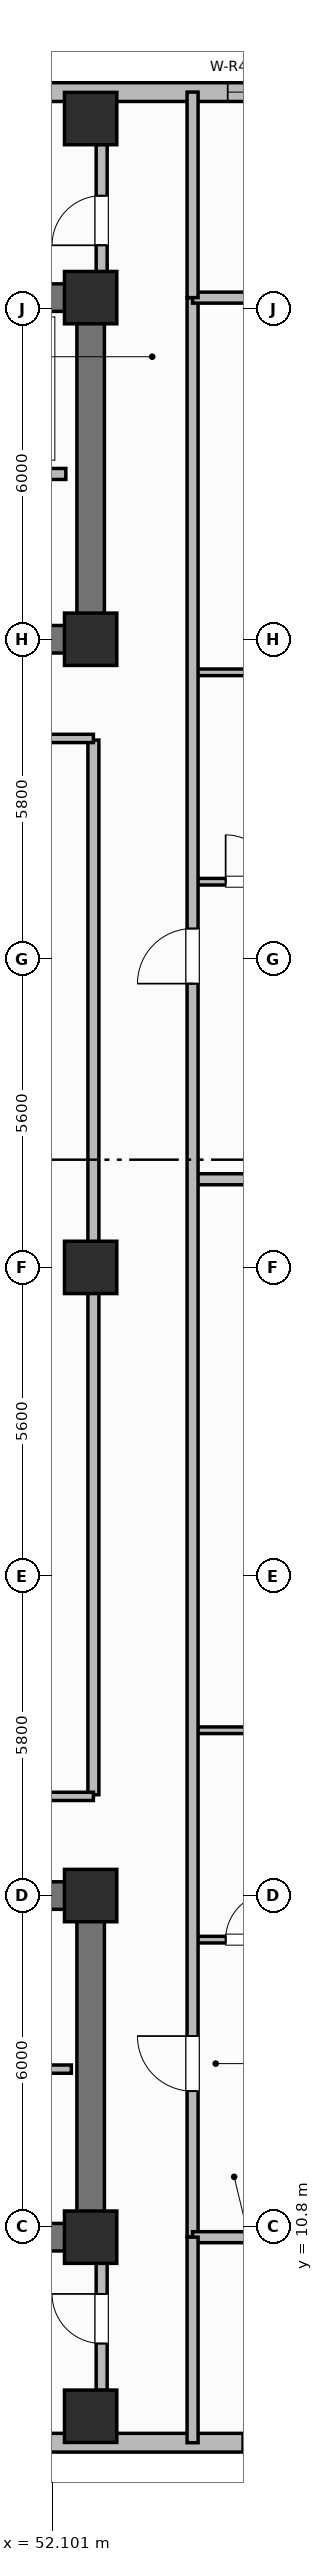
"""IFC4 building model, lengths in metres.
Left out: names, types, materials, properties, quantities, classifications, styles, units other than length and angle.
Written with IfcOpenShell. Run it as: python <this file> out.ifc"""

import sys

from ifc_helpers import new_model, si_unit, direction, frame, frame_2d, origin, origin_2d, place, context, subcontext, project, spatial, rectangle, extrude, element, fill, save


model = new_model("IFC4")
c1 = context("Model", 3, precision=1e-05, world=origin(), true_north=direction((0.0, 1.0)))
c2 = subcontext(c1, "Body", "Model", "MODEL_VIEW")
j1 = project(units=[si_unit("LENGTHUNIT", "METRE"), si_unit("PLANEANGLEUNIT", "RADIAN")], contexts=[c1])
p1 = place(None, origin())
s1 = spatial("IfcSite", under=j1, at=p1, CompositionType="ELEMENT")
p2 = place(p1, origin())
s2 = spatial("IfcBuilding", under=s1, at=p2, CompositionType="ELEMENT")
p3 = place(p2, frame((0.0, 0.0, 155.2)))
s3 = spatial("IfcBuildingStorey", under=s2, at=p3, CompositionType="ELEMENT", Elevation=155.2)
p4 = place(p3, frame((52.8, 10.6, 0.0), z_axis=(0.0, 0.0, 1.0), x_axis=(-1.0, 0.0, 0.0)))
e1 = element("IfcWall", 1, at=p4, inside=s3, PredefinedType="SHEAR", context=c2, shape_type="SweptSolid", body=[
    extrude(rectangle(XDim=27.2, YDim=0.5, at=frame_2d((13.6, 0.0))), origin(), (0.0, 0.0, 1.0), 3.7),
])
p5 = place(p3, frame((52.8, 10.85, 0.0), z_axis=(0.0, 0.0, 1.0), x_axis=(0.0, 1.0, 0.0)))
e2 = element("IfcWall", 2, at=p5, inside=s3, PredefinedType="SHEAR", context=c2, shape_type="SweptSolid", body=[
    extrude(rectangle(XDim=5.7, YDim=0.5, at=frame_2d((2.85, 0.0))), origin(), (0.0, 0.0, 1.0), 3.7),
])
p6 = place(p3, frame((25.6, 16.8, 0.0), z_axis=(0.0, 0.0, 1.0), x_axis=(1.0, 0.0, 0.0)))
e3 = element("IfcWall", 3, at=p6, inside=s3, PredefinedType="SHEAR", context=c2, shape_type="SweptSolid", body=[
    extrude(rectangle(XDim=27.2, YDim=0.5, at=frame_2d((13.6, 0.0))), origin(), (0.0, 0.0, 1.0), 3.7),
])
p7 = place(p6, frame((1.7, 0.0, 0.0)))
e4 = element("IfcOpeningElement", 4, at=p7, cuts=e3, PredefinedType="OPENING", context=c2, shape_type="SweptSolid", body=[
    extrude(rectangle(XDim=1.1, YDim=2.15, at=frame_2d((0.55, 1.075))), frame((0.0, 0.26, 0.0), z_axis=(0.0, -1.0, 0.0), x_axis=(1.0, 0.0, 0.0)), (0.0, 0.0, 1.0), 0.52),
])
p8 = place(p6, frame((4.45, 0.0, 0.0)))
e5 = element("IfcOpeningElement", 5, at=p8, cuts=e3, PredefinedType="OPENING", context=c2, shape_type="SweptSolid", body=[
    extrude(rectangle(XDim=0.85, YDim=2.1, at=frame_2d((0.425, 1.05))), frame((0.0, 0.26, 0.0), z_axis=(0.0, -1.0, 0.0), x_axis=(1.0, 0.0, 0.0)), (0.0, 0.0, 1.0), 0.52),
])
p9 = place(p6, frame((6.5, 0.0, 0.0)))
e6 = element("IfcOpeningElement", 6, at=p9, cuts=e3, PredefinedType="OPENING", context=c2, shape_type="SweptSolid", body=[
    extrude(rectangle(XDim=0.85, YDim=2.1, at=frame_2d((0.425, 1.05))), frame((0.0, 0.26, 0.0), z_axis=(0.0, -1.0, 0.0), x_axis=(1.0, 0.0, 0.0)), (0.0, 0.0, 1.0), 0.52),
])
p10 = place(p6, frame((13.0, 0.0, 0.0)))
e7 = element("IfcOpeningElement", 7, at=p10, cuts=e3, PredefinedType="OPENING", context=c2, shape_type="SweptSolid", body=[
    extrude(rectangle(XDim=1.2, YDim=2.15, at=frame_2d((0.6, 1.075))), frame((0.0, 0.26, 0.0), z_axis=(0.0, -1.0, 0.0), x_axis=(1.0, 0.0, 0.0)), (0.0, 0.0, 1.0), 0.52),
])
p11 = place(p6, frame((19.8, 0.0, 0.0)))
e8 = element("IfcOpeningElement", 8, at=p11, cuts=e3, PredefinedType="OPENING", context=c2, shape_type="SweptSolid", body=[
    extrude(rectangle(XDim=0.85, YDim=2.1, at=frame_2d((0.425, 1.05))), frame((0.0, 0.26, 0.0), z_axis=(0.0, -1.0, 0.0), x_axis=(1.0, 0.0, 0.0)), (0.0, 0.0, 1.0), 0.52),
])
p12 = place(p6, frame((24.2, 0.0, 0.0)))
e9 = element("IfcOpeningElement", 9, at=p12, cuts=e3, PredefinedType="OPENING", context=c2, shape_type="SweptSolid", body=[
    extrude(rectangle(XDim=0.85, YDim=2.1, at=frame_2d((0.425, 1.05))), frame((0.0, 0.26, 0.0), z_axis=(0.0, -1.0, 0.0), x_axis=(1.0, 0.0, 0.0)), (0.0, 0.0, 1.0), 0.52),
])
p13 = place(p3, frame((25.6, 45.8, 0.0), z_axis=(0.0, 0.0, 1.0), x_axis=(1.0, 0.0, 0.0)))
e10 = element("IfcWall", 10, at=p13, inside=s3, PredefinedType="SHEAR", context=c2, shape_type="SweptSolid", body=[
    extrude(rectangle(XDim=27.2, YDim=0.5, at=frame_2d((13.6, 0.0))), origin(), (0.0, 0.0, 1.0), 3.7),
])
p14 = place(p3, frame((52.8, 39.85, 0.0), z_axis=(0.0, 0.0, 1.0), x_axis=(0.0, 1.0, 0.0)))
e11 = element("IfcWall", 11, at=p14, inside=s3, PredefinedType="SHEAR", context=c2, shape_type="SweptSolid", body=[
    extrude(rectangle(XDim=5.7, YDim=0.5, at=frame_2d((2.85, 0.0))), origin(), (0.0, 0.0, 1.0), 3.7),
])
p15 = place(p3, frame((52.8, 39.6, 0.0), z_axis=(0.0, 0.0, 1.0), x_axis=(-1.0, 0.0, 0.0)))
e12 = element("IfcWall", 12, at=p15, inside=s3, PredefinedType="SHEAR", context=c2, shape_type="SweptSolid", body=[
    extrude(rectangle(XDim=27.2, YDim=0.5, at=frame_2d((13.6, 0.0))), origin(), (0.0, 0.0, 1.0), 3.7),
])
p16 = place(p15, frame((24.3, 0.0, 0.0)))
e13 = element("IfcOpeningElement", 13, at=p16, cuts=e12, PredefinedType="OPENING", context=c2, shape_type="SweptSolid", body=[
    extrude(rectangle(XDim=1.1, YDim=2.15, at=frame_2d((0.55, 1.075))), frame((0.0, 0.26, 0.0), z_axis=(0.0, -1.0, 0.0), x_axis=(1.0, 0.0, 0.0)), (0.0, 0.0, 1.0), 0.52),
])
p17 = place(p15, frame((21.85, 0.0, 0.0)))
e14 = element("IfcOpeningElement", 14, at=p17, cuts=e12, PredefinedType="OPENING", context=c2, shape_type="SweptSolid", body=[
    extrude(rectangle(XDim=0.85, YDim=2.1, at=frame_2d((0.425, 1.05))), frame((0.0, 0.26, 0.0), z_axis=(0.0, -1.0, 0.0), x_axis=(1.0, 0.0, 0.0)), (0.0, 0.0, 1.0), 0.52),
])
p18 = place(p15, frame((19.85, 0.0, 0.0)))
e15 = element("IfcOpeningElement", 15, at=p18, cuts=e12, PredefinedType="OPENING", context=c2, shape_type="SweptSolid", body=[
    extrude(rectangle(XDim=0.85, YDim=2.1, at=frame_2d((0.425, 1.05))), frame((0.0, 0.26, 0.0), z_axis=(0.0, -1.0, 0.0), x_axis=(1.0, 0.0, 0.0)), (0.0, 0.0, 1.0), 0.52),
])
p19 = place(p15, frame((15.1, 0.0, 0.0)))
e16 = element("IfcOpeningElement", 16, at=p19, cuts=e12, PredefinedType="OPENING", context=c2, shape_type="SweptSolid", body=[
    extrude(rectangle(XDim=1.2, YDim=2.15, at=frame_2d((0.6, 1.075))), frame((0.0, 0.26, 0.0), z_axis=(0.0, -1.0, 0.0), x_axis=(1.0, 0.0, 0.0)), (0.0, 0.0, 1.0), 0.52),
])
p20 = place(p15, frame((12.6, 0.0, 0.0)))
e17 = element("IfcOpeningElement", 17, at=p20, cuts=e12, PredefinedType="OPENING", context=c2, shape_type="SweptSolid", body=[
    extrude(rectangle(XDim=0.85, YDim=2.1, at=frame_2d((0.425, 1.05))), frame((0.0, 0.26, 0.0), z_axis=(0.0, -1.0, 0.0), x_axis=(1.0, 0.0, 0.0)), (0.0, 0.0, 1.0), 0.52),
])
p21 = place(p15, frame((10.85, 0.0, 0.0)))
e18 = element("IfcOpeningElement", 18, at=p21, cuts=e12, PredefinedType="OPENING", context=c2, shape_type="SweptSolid", body=[
    extrude(rectangle(XDim=0.85, YDim=2.1, at=frame_2d((0.425, 1.05))), frame((0.0, 0.26, 0.0), z_axis=(0.0, -1.0, 0.0), x_axis=(1.0, 0.0, 0.0)), (0.0, 0.0, 1.0), 0.52),
])
p22 = place(p15, frame((7.35, 0.0, 0.0)))
e19 = element("IfcOpeningElement", 19, at=p22, cuts=e12, PredefinedType="OPENING", context=c2, shape_type="SweptSolid", body=[
    extrude(rectangle(XDim=0.85, YDim=2.1, at=frame_2d((0.425, 1.05))), frame((0.0, 0.26, 0.0), z_axis=(0.0, -1.0, 0.0), x_axis=(1.0, 0.0, 0.0)), (0.0, 0.0, 1.0), 0.52),
])
p23 = place(p15, frame((5.35, 0.0, 0.0)))
e20 = element("IfcOpeningElement", 20, at=p23, cuts=e12, PredefinedType="OPENING", context=c2, shape_type="SweptSolid", body=[
    extrude(rectangle(XDim=0.85, YDim=2.1, at=frame_2d((0.425, 1.05))), frame((0.0, 0.26, 0.0), z_axis=(0.0, -1.0, 0.0), x_axis=(1.0, 0.0, 0.0)), (0.0, 0.0, 1.0), 0.52),
])
p24 = place(p15, frame((2.0, 0.0, 0.0)))
e21 = element("IfcOpeningElement", 21, at=p24, cuts=e12, PredefinedType="OPENING", context=c2, shape_type="SweptSolid", body=[
    extrude(rectangle(XDim=0.85, YDim=2.1, at=frame_2d((0.425, 1.05))), frame((0.0, 0.26, 0.0), z_axis=(0.0, -1.0, 0.0), x_axis=(1.0, 0.0, 0.0)), (0.0, 0.0, 1.0), 0.52),
])
for number, where, z_axis, x_axis in (
    (22, (52.8, 10.6, 0.0), (0.0, 0.0, 1.0), (1.0, 0.0, 0.0)),
    (23, (52.8, 16.8, 0.0), (0.0, 0.0, 1.0), (1.0, 0.0, 0.0)),
    (24, (52.8, 39.6, 0.0), (0.0, 0.0, 1.0), (1.0, 0.0, 0.0)),
    (25, (52.8, 45.8, 0.0), (0.0, 0.0, 1.0), (1.0, 0.0, 0.0)),
    (26, (52.8, 28.2, 0.0), (0.0, 0.0, 1.0), (1.0, 0.0, 0.0)),
    (27, (52.8, 7.35, 0.0), (0.0, 0.0, 1.0), (1.0, 0.0, 0.0)),
    (28, (52.8, 49.05, 0.0), (0.0, 0.0, 1.0), (1.0, 0.0, 0.0)),
):
    element("IfcColumn", number, at=place(p3, frame(where, z_axis=z_axis, x_axis=x_axis)), inside=s3, PredefinedType="COLUMN", context=c2, shape_type="SweptSolid", body=[
        extrude(rectangle(XDim=0.95, YDim=0.95, at=origin_2d()), origin(), (0.0, 0.0, 1.0), 3.7),
    ])
p25 = place(p3, frame((42.4, 6.87, 0.0), z_axis=(0.0, 0.0, 1.0), x_axis=(1.0, 0.0, 0.0)))
e29 = element("IfcWall", 29, at=p25, inside=s3, PredefinedType="SOLIDWALL", context=c2, shape_type="SweptSolid", body=[
    extrude(rectangle(XDim=15.8, YDim=0.34, at=frame_2d((7.9, 0.0))), origin(), (0.0, 0.0, 1.0), 2.72),
])
p26 = place(p25, frame((2.25, 0.0, 0.95)))
e30 = element("IfcOpeningElement", 30, at=p26, cuts=e29, PredefinedType="OPENING", context=c2, shape_type="SweptSolid", body=[
    extrude(rectangle(XDim=1.1, YDim=1.65, at=frame_2d((0.55, 0.825))), frame((0.0, 0.18, 0.0), z_axis=(0.0, -1.0, 0.0), x_axis=(1.0, 0.0, 0.0)), (0.0, 0.0, 1.0), 0.36),
])
p27 = place(p25, frame((5.15, 0.0, 0.95)))
e31 = element("IfcOpeningElement", 31, at=p27, cuts=e29, PredefinedType="OPENING", context=c2, shape_type="SweptSolid", body=[
    extrude(rectangle(XDim=1.1, YDim=1.65, at=frame_2d((0.55, 0.825))), frame((0.0, 0.18, 0.0), z_axis=(0.0, -1.0, 0.0), x_axis=(1.0, 0.0, 0.0)), (0.0, 0.0, 1.0), 0.36),
])
p28 = place(p25, frame((7.35, 0.0, 0.95)))
e32 = element("IfcOpeningElement", 32, at=p28, cuts=e29, PredefinedType="OPENING", context=c2, shape_type="SweptSolid", body=[
    extrude(rectangle(XDim=1.1, YDim=1.65, at=frame_2d((0.55, 0.825))), frame((0.0, 0.18, 0.0), z_axis=(0.0, -1.0, 0.0), x_axis=(1.0, 0.0, 0.0)), (0.0, 0.0, 1.0), 0.36),
])
p29 = place(p25, frame((13.15, 0.0, 0.95)))
e33 = element("IfcOpeningElement", 33, at=p29, cuts=e29, PredefinedType="OPENING", context=c2, shape_type="SweptSolid", body=[
    extrude(rectangle(XDim=1.1, YDim=1.65, at=frame_2d((0.55, 0.825))), frame((0.0, 0.18, 0.0), z_axis=(0.0, -1.0, 0.0), x_axis=(1.0, 0.0, 0.0)), (0.0, 0.0, 1.0), 0.36),
])
p30 = place(p3, frame((58.2, 49.53, 0.0), z_axis=(0.0, 0.0, 1.0), x_axis=(-1.0, 0.0, 0.0)))
e34 = element("IfcWall", 34, at=p30, inside=s3, PredefinedType="SOLIDWALL", context=c2, shape_type="SweptSolid", body=[
    extrude(rectangle(XDim=15.8, YDim=0.34, at=frame_2d((7.9, 0.0))), origin(), (0.0, 0.0, 1.0), 2.72),
])
p31 = place(p30, frame((1.312, 0.0, 0.7)))
e35 = element("IfcOpeningElement", 35, at=p31, cuts=e34, PredefinedType="OPENING", context=c2, shape_type="SweptSolid", body=[
    extrude(rectangle(XDim=1.6, YDim=1.9, at=frame_2d((0.8, 0.95))), frame((0.0, 0.18, 0.0), z_axis=(0.0, -1.0, 0.0), x_axis=(1.0, 0.0, 0.0)), (0.0, 0.0, 1.0), 0.36),
])
p32 = place(p30, frame((8.562, 0.0, 0.7)))
e36 = element("IfcOpeningElement", 36, at=p32, cuts=e34, PredefinedType="OPENING", context=c2, shape_type="SweptSolid", body=[
    extrude(rectangle(XDim=1.6, YDim=1.9, at=frame_2d((0.8, 0.95))), frame((0.0, 0.18, 0.0), z_axis=(0.0, -1.0, 0.0), x_axis=(1.0, 0.0, 0.0)), (0.0, 0.0, 1.0), 0.36),
])
p33 = place(p30, frame((11.837, 0.0, 0.7)))
e37 = element("IfcOpeningElement", 37, at=p33, cuts=e34, PredefinedType="OPENING", context=c2, shape_type="SweptSolid", body=[
    extrude(rectangle(XDim=1.6, YDim=1.9, at=frame_2d((0.8, 0.95))), frame((0.0, 0.18, 0.0), z_axis=(0.0, -1.0, 0.0), x_axis=(1.0, 0.0, 0.0)), (0.0, 0.0, 1.0), 0.36),
])
p34 = place(p3, frame((48.05, 13.65, 0.0), z_axis=(0.0, 0.0, 1.0), x_axis=(1.0, 0.0, 0.0)))
e38 = element("IfcWall", 38, at=p34, inside=s3, PredefinedType="PARTITIONING", context=c2, shape_type="SweptSolid", body=[
    extrude(rectangle(XDim=4.4, YDim=0.15, at=frame_2d((2.2, 0.0))), origin(), (0.0, 0.0, 1.0), 2.55),
])
p35 = place(p34, frame((1.6, 0.0, 0.0)))
e39 = element("IfcOpeningElement", 39, at=p35, cuts=e38, PredefinedType="OPENING", context=c2, shape_type="SweptSolid", body=[
    extrude(rectangle(XDim=0.85, YDim=2.1, at=frame_2d((0.425, 1.05))), frame((0.0, 0.085, 0.0), z_axis=(0.0, -1.0, 0.0), x_axis=(1.0, 0.0, 0.0)), (0.0, 0.0, 1.0), 0.17),
])
p36 = place(p3, frame((52.35, 42.6, 0.0), z_axis=(0.0, 0.0, 1.0), x_axis=(-1.0, 0.0, 0.0)))
e40 = element("IfcWall", 40, at=p36, inside=s3, PredefinedType="PARTITIONING", context=c2, shape_type="SweptSolid", body=[
    extrude(rectangle(XDim=6.5, YDim=0.2, at=frame_2d((3.25, 0.0))), origin(), (0.0, 0.0, 1.0), 2.55),
])
p37 = place(p3, frame((52.85, 18.63, 0.0), z_axis=(0.0, 0.0, 1.0), x_axis=(0.0, 1.0, 0.0)))
e41 = element("IfcWall", 41, at=p37, inside=s3, PredefinedType="PARTITIONING", context=c2, shape_type="SweptSolid", body=[
    extrude(rectangle(XDim=19.14, YDim=0.2, at=frame_2d((9.57, 0.0))), origin(), (0.0, 0.0, 1.0), 2.55),
])
for number, where, z_axis, x_axis in (
    (42, (31.35, 18.6, 0.0), (0.0, 0.0, 1.0), (1.0, 0.0, 0.0)),
    (43, (31.35, 37.8, 0.0), (0.0, 0.0, 1.0), (1.0, 0.0, 0.0)),
):
    element("IfcWall", number, at=place(p3, frame(where, z_axis=z_axis, x_axis=x_axis)), inside=s3, PredefinedType="PARTITIONING", context=c2, shape_type="SweptSolid", body=[
        extrude(rectangle(XDim=21.5, YDim=0.15, at=frame_2d((10.75, 0.0))), origin(), (0.0, 0.0, 1.0), 2.55),
    ])
p38 = place(p3, frame((54.65, 16.0, 0.0), z_axis=(0.0, 0.0, 1.0), x_axis=(1.0, 0.0, 0.0)))
e44 = element("IfcWall", 44, at=p38, inside=s3, PredefinedType="PARTITIONING", context=c2, shape_type="SweptSolid", body=[
    extrude(rectangle(XDim=2.25, YDim=0.12, at=frame_2d((1.125, 0.0))), origin(), (0.0, 0.0, 1.0), 2.55),
])
p39 = place(p38, frame((0.6, 0.0, 0.0)))
e45 = element("IfcOpeningElement", 45, at=p39, cuts=e44, PredefinedType="OPENING", context=c2, shape_type="SweptSolid", body=[
    extrude(rectangle(XDim=0.85, YDim=2.1, at=frame_2d((0.425, 1.05))), frame((0.0, 0.07, 0.0), z_axis=(0.0, -1.0, 0.0), x_axis=(1.0, 0.0, 0.0)), (0.0, 0.0, 1.0), 0.14),
])
p40 = place(p3, frame((54.65, 19.8, 0.0), z_axis=(0.0, 0.0, 1.0), x_axis=(1.0, 0.0, 0.0)))
e46 = element("IfcWall", 46, at=p40, inside=s3, PredefinedType="PARTITIONING", context=c2, shape_type="SweptSolid", body=[
    extrude(rectangle(XDim=2.25, YDim=0.12, at=frame_2d((1.125, 0.0))), origin(), (0.0, 0.0, 1.0), 2.55),
])
p41 = place(p3, frame((54.65, 29.8, 0.0), z_axis=(0.0, 0.0, 1.0), x_axis=(1.0, 0.0, 0.0)))
e47 = element("IfcWall", 47, at=p41, inside=s3, PredefinedType="PARTITIONING", context=c2, shape_type="SweptSolid", body=[
    extrude(rectangle(XDim=6.666, YDim=0.2, at=frame_2d((3.333, 0.0))), origin(), (0.0, 0.0, 1.0), 2.55),
])
p42 = place(p3, frame((54.65, 35.2, 0.0), z_axis=(0.0, 0.0, 1.0), x_axis=(1.0, 0.0, 0.0)))
e48 = element("IfcWall", 48, at=p42, inside=s3, PredefinedType="PARTITIONING", context=c2, shape_type="SweptSolid", body=[
    extrude(rectangle(XDim=2.25, YDim=0.12, at=frame_2d((1.125, 0.0))), origin(), (0.0, 0.0, 1.0), 2.55),
])
p43 = place(p42, frame((0.6, 0.0, 0.0)))
e49 = element("IfcOpeningElement", 49, at=p43, cuts=e48, PredefinedType="OPENING", context=c2, shape_type="SweptSolid", body=[
    extrude(rectangle(XDim=0.85, YDim=2.1, at=frame_2d((0.425, 1.05))), frame((0.0, 0.07, 0.0), z_axis=(0.0, -1.0, 0.0), x_axis=(1.0, 0.0, 0.0)), (0.0, 0.0, 1.0), 0.14),
])
p44 = place(p3, frame((54.65, 39.0, 0.0), z_axis=(0.0, 0.0, 1.0), x_axis=(1.0, 0.0, 0.0)))
e50 = element("IfcWall", 50, at=p44, inside=s3, PredefinedType="PARTITIONING", context=c2, shape_type="SweptSolid", body=[
    extrude(rectangle(XDim=2.25, YDim=0.12, at=frame_2d((1.125, 0.0))), origin(), (0.0, 0.0, 1.0), 2.55),
])
p45 = place(p3, frame((54.65, 10.6, 0.0), z_axis=(0.0, 0.0, 1.0), x_axis=(0.0, 1.0, 0.0)))
e51 = element("IfcWall", 51, at=p45, inside=s3, PredefinedType="PARTITIONING", context=c2, shape_type="SweptSolid", body=[
    extrude(rectangle(XDim=35.2, YDim=0.2, at=frame_2d((17.6, 0.0))), origin(), (0.0, 0.0, 1.0), 2.55),
])
p46 = place(p45, frame((2.65, 0.0, 0.0)))
e52 = element("IfcOpeningElement", 52, at=p46, cuts=e51, PredefinedType="OPENING", context=c2, shape_type="SweptSolid", body=[
    extrude(rectangle(XDim=1.0, YDim=2.15, at=frame_2d((0.5, 1.075))), frame((0.0, 0.11, 0.0), z_axis=(0.0, -1.0, 0.0), x_axis=(1.0, 0.0, 0.0)), (0.0, 0.0, 1.0), 0.22),
])
p47 = place(p45, frame((22.75, 0.0, 0.0)))
e53 = element("IfcOpeningElement", 53, at=p47, cuts=e51, PredefinedType="OPENING", context=c2, shape_type="SweptSolid", body=[
    extrude(rectangle(XDim=1.0, YDim=2.15, at=frame_2d((0.5, 1.075))), frame((0.0, 0.11, 0.0), z_axis=(0.0, -1.0, 0.0), x_axis=(1.0, 0.0, 0.0)), (0.0, 0.0, 1.0), 0.22),
])
for number, where, z_axis, x_axis in (
    (54, (54.65, 10.6, 0.0), (0.0, 0.0, 1.0), (1.0, 0.0, 0.0)),
    (55, (54.65, 45.8, 0.0), (0.0, 0.0, 1.0), (1.0, 0.0, 0.0)),
):
    element("IfcWall", number, at=place(p3, frame(where, z_axis=z_axis, x_axis=x_axis)), inside=s3, PredefinedType="PARTITIONING", context=c2, shape_type="SweptSolid", body=[
        extrude(rectangle(XDim=6.76, YDim=0.2, at=frame_2d((3.38, 0.0))), origin(), (0.0, 0.0, 1.0), 2.55),
    ])
for number, where, z_axis, x_axis in (
    (56, (54.65, 6.87, 0.0), (0.0, 0.0, 1.0), (0.0, 1.0, 0.0)),
    (57, (54.65, 45.8, 0.0), (0.0, 0.0, 1.0), (0.0, 1.0, 0.0)),
):
    element("IfcWall", number, at=place(p3, frame(where, z_axis=z_axis, x_axis=x_axis)), inside=s3, PredefinedType="PARTITIONING", context=c2, shape_type="SweptSolid", body=[
        extrude(rectangle(XDim=3.73, YDim=0.2, at=frame_2d((1.865, 0.0))), origin(), (0.0, 0.0, 1.0), 2.55),
    ])
p48 = place(p3, frame((53.0, 7.82, 0.0), z_axis=(0.0, 0.0, 1.0), x_axis=(0.0, 1.0, 0.0)))
e58 = element("IfcWall", 58, at=p48, inside=s3, PredefinedType="PARTITIONING", context=c2, shape_type="SweptSolid", body=[
    extrude(rectangle(XDim=2.48, YDim=0.2, at=frame_2d((1.24, 0.0))), origin(), (0.0, 0.0, 1.0), 2.55),
])
p49 = place(p48, frame((0.85, 0.0, 0.0)))
e59 = element("IfcOpeningElement", 59, at=p49, cuts=e58, PredefinedType="OPENING", context=c2, shape_type="SweptSolid", body=[
    extrude(rectangle(XDim=0.9, YDim=2.1, at=frame_2d((0.45, 1.05))), frame((0.0, 0.11, 0.0), z_axis=(0.0, -1.0, 0.0), x_axis=(1.0, 0.0, 0.0)), (0.0, 0.0, 1.0), 0.22),
])
p50 = place(p3, frame((53.0, 46.1, 0.0), z_axis=(0.0, 0.0, 1.0), x_axis=(0.0, 1.0, 0.0)))
e60 = element("IfcWall", 60, at=p50, inside=s3, PredefinedType="PARTITIONING", context=c2, shape_type="SweptSolid", body=[
    extrude(rectangle(XDim=2.48, YDim=0.2, at=frame_2d((1.24, 0.0))), origin(), (0.0, 0.0, 1.0), 2.55),
])
p51 = place(p50, frame((0.65, 0.0, 0.0)))
e61 = element("IfcOpeningElement", 61, at=p51, cuts=e60, PredefinedType="OPENING", context=c2, shape_type="SweptSolid", body=[
    extrude(rectangle(XDim=0.9, YDim=2.1, at=frame_2d((0.45, 1.05))), frame((0.0, 0.11, 0.0), z_axis=(0.0, -1.0, 0.0), x_axis=(1.0, 0.0, 0.0)), (0.0, 0.0, 1.0), 0.22),
])
p52 = place(p29, origin())
e62 = element("IfcWindow", 62, at=p52, inside=s3, PartitioningType="SINGLE_PANEL", PredefinedType="WINDOW", context=c2, shape_type="SweptSolid", body=[
    extrude(rectangle(XDim=1.1, YDim=1.65, at=frame_2d((0.55, 0.825))), frame((0.0, 0.03, 0.0), z_axis=(0.0, -1.0, 0.0), x_axis=(1.0, 0.0, 0.0)), (0.0, 0.0, 1.0), 0.06),
])
fill(e33, e62)
p53 = place(p31, origin())
e63 = element("IfcWindow", 63, at=p53, inside=s3, PartitioningType="SINGLE_PANEL", PredefinedType="WINDOW", context=c2, shape_type="SweptSolid", body=[
    extrude(rectangle(XDim=1.6, YDim=1.9, at=frame_2d((0.8, 0.95))), frame((0.0, 0.03, 0.0), z_axis=(0.0, -1.0, 0.0), x_axis=(1.0, 0.0, 0.0)), (0.0, 0.0, 1.0), 0.06),
])
fill(e35, e63)
p54 = place(p39, origin())
e64 = element("IfcDoor", 64, at=p54, inside=s3, OperationType="SINGLE_SWING_RIGHT", PredefinedType="DOOR", context=c2, shape_type="SweptSolid", body=[
    extrude(rectangle(XDim=0.85, YDim=2.1, at=frame_2d((0.425, 1.05))), frame((0.0, 0.025, 0.0), z_axis=(0.0, -1.0, 0.0), x_axis=(1.0, 0.0, 0.0)), (0.0, 0.0, 1.0), 0.05),
])
fill(e45, e64)
p55 = place(p43, origin())
e65 = element("IfcDoor", 65, at=p55, inside=s3, OperationType="SINGLE_SWING_LEFT", PredefinedType="DOOR", context=c2, shape_type="SweptSolid", body=[
    extrude(rectangle(XDim=0.85, YDim=2.1, at=frame_2d((0.425, 1.05))), frame((0.0, 0.025, 0.0), z_axis=(0.0, -1.0, 0.0), x_axis=(1.0, 0.0, 0.0)), (0.0, 0.0, 1.0), 0.05),
])
fill(e49, e65)
p56 = place(p46, origin())
e66 = element("IfcDoor", 66, at=p56, inside=s3, OperationType="SINGLE_SWING_RIGHT", PredefinedType="DOOR", context=c2, shape_type="SweptSolid", body=[
    extrude(rectangle(XDim=1.0, YDim=2.15, at=frame_2d((0.5, 1.075))), frame((0.0, 0.025, 0.0), z_axis=(0.0, -1.0, 0.0), x_axis=(1.0, 0.0, 0.0)), (0.0, 0.0, 1.0), 0.05),
])
fill(e52, e66)
p57 = place(p47, origin())
e67 = element("IfcDoor", 67, at=p57, inside=s3, OperationType="SINGLE_SWING_LEFT", PredefinedType="DOOR", context=c2, shape_type="SweptSolid", body=[
    extrude(rectangle(XDim=1.0, YDim=2.15, at=frame_2d((0.5, 1.075))), frame((0.0, 0.025, 0.0), z_axis=(0.0, -1.0, 0.0), x_axis=(1.0, 0.0, 0.0)), (0.0, 0.0, 1.0), 0.05),
])
fill(e53, e67)
p58 = place(p49, origin())
e68 = element("IfcDoor", 68, at=p58, inside=s3, OperationType="SINGLE_SWING_RIGHT", PredefinedType="DOOR", context=c2, shape_type="SweptSolid", body=[
    extrude(rectangle(XDim=0.9, YDim=2.1, at=frame_2d((0.45, 1.05))), frame((0.0, 0.025, 0.0), z_axis=(0.0, -1.0, 0.0), x_axis=(1.0, 0.0, 0.0)), (0.0, 0.0, 1.0), 0.05),
])
fill(e59, e68)
p59 = place(p51, origin())
e69 = element("IfcDoor", 69, at=p59, inside=s3, OperationType="SINGLE_SWING_LEFT", PredefinedType="DOOR", context=c2, shape_type="SweptSolid", body=[
    extrude(rectangle(XDim=0.9, YDim=2.1, at=frame_2d((0.45, 1.05))), frame((0.0, 0.025, 0.0), z_axis=(0.0, -1.0, 0.0), x_axis=(1.0, 0.0, 0.0)), (0.0, 0.0, 1.0), 0.05),
])
fill(e61, e69)
save(model, sys.argv[1])
